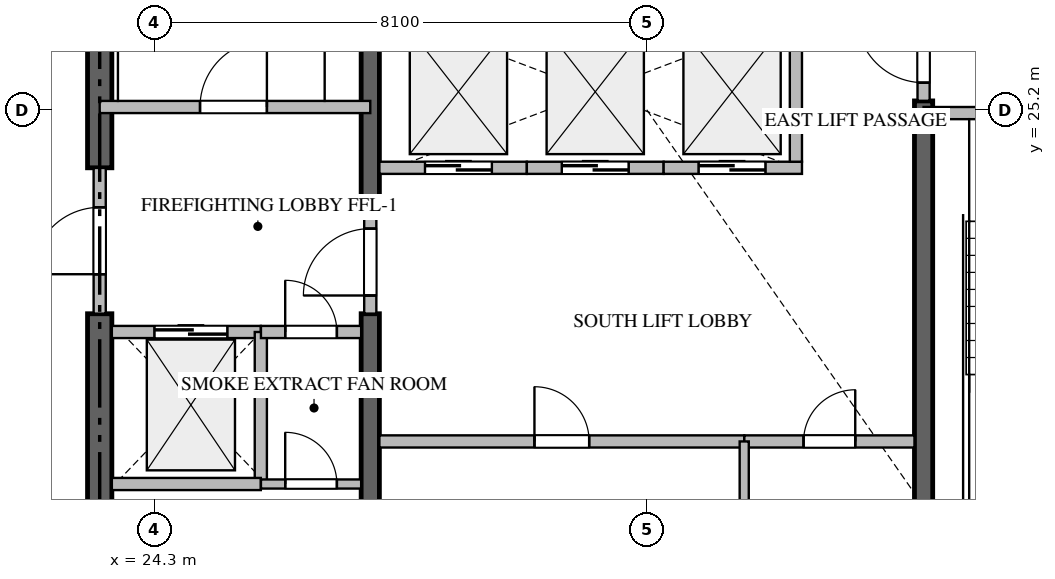
"""IFC4 building model, lengths in metres.
Left out: names, types, materials, properties, quantities, classifications, styles, units other than length and angle.
Written with IfcOpenShell. Run it as: python <this file> out.ifc"""

import sys

from ifc_helpers import new_model, si_unit, direction, frame, frame_2d, origin, place, context, subcontext, project, spatial, rectangle, extrude, source, transform, mapped, element, fill, save


model = new_model("IFC4")
c1 = context("Model", 3, precision=1e-05, world=origin(), true_north=direction((0.0, 1.0)))
c2 = subcontext(c1, "Body", "Model", "MODEL_VIEW")
j1 = project(units=[si_unit("LENGTHUNIT", "METRE"), si_unit("PLANEANGLEUNIT", "RADIAN")], contexts=[c1])
p1 = place(None, origin())
s1 = spatial("IfcSite", under=j1, at=p1, CompositionType="ELEMENT")
p2 = place(p1, origin())
s2 = spatial("IfcBuilding", under=s1, at=p2, CompositionType="ELEMENT")
p3 = place(p2, frame((0.0, 0.0, 191.4)))
s3 = spatial("IfcBuildingStorey", under=s2, at=p3, CompositionType="ELEMENT", Elevation=191.4)
p4 = place(p3, frame((23.4, 17.0, -0.26), z_axis=(0.0, 0.0, 1.0), x_axis=(0.0, 1.0, 0.0)))
e1 = element("IfcWall", 1, at=p4, inside=s3, PredefinedType="SHEAR", context=c2, shape_type="SweptSolid", body=[
    extrude(rectangle(XDim=4.85, YDim=0.4, at=frame_2d((2.425, 0.0))), origin(), (0.0, 0.0, 1.0), 3.748),
])
p5 = place(p3, frame((23.4, 24.25, -0.26), z_axis=(0.0, 0.0, 1.0), x_axis=(0.0, 1.0, 0.0)))
e2 = element("IfcWall", 2, at=p5, inside=s3, PredefinedType="SHEAR", context=c2, shape_type="SweptSolid", body=[
    extrude(rectangle(XDim=9.15, YDim=0.4, at=frame_2d((4.575, 0.0))), origin(), (0.0, 0.0, 1.0), 3.748),
])
p6 = place(p3, frame((27.85, 17.0, -0.26), z_axis=(0.0, 0.0, 1.0), x_axis=(0.0, 1.0, 0.0)))
e3 = element("IfcWall", 3, at=p6, inside=s3, PredefinedType="SHEAR", context=c2, shape_type="SweptSolid", body=[
    extrude(rectangle(XDim=4.85, YDim=0.3, at=frame_2d((2.425, 0.0))), origin(), (0.0, 0.0, 1.0), 3.748),
])
p7 = place(p3, frame((27.85, 23.55, -0.26), z_axis=(0.0, 0.0, 1.0), x_axis=(0.0, 1.0, 0.0)))
e4 = element("IfcWall", 4, at=p7, inside=s3, PredefinedType="SHEAR", context=c2, shape_type="SweptSolid", body=[
    extrude(rectangle(XDim=9.85, YDim=0.3, at=frame_2d((4.925, 0.0))), origin(), (0.0, 0.0, 1.0), 3.748),
])
p8 = place(p3, frame((36.95, 17.0, -0.26), z_axis=(0.0, 0.0, 1.0), x_axis=(0.0, 1.0, 0.0)))
e5 = element("IfcWall", 5, at=p8, inside=s3, PredefinedType="SHEAR", context=c2, shape_type="SweptSolid", body=[
    extrude(rectangle(XDim=8.35, YDim=0.3, at=frame_2d((4.175, 0.0))), origin(), (0.0, 0.0, 1.0), 3.748),
])
p9 = place(p3, frame((23.4, 25.25, 0.0), z_axis=(0.0, 0.0, 1.0), x_axis=(1.0, 0.0, 0.0)))
e6 = element("IfcWall", 6, at=p9, inside=s3, PredefinedType="STANDARD", context=c2, shape_type="SweptSolid", body=[
    extrude(rectangle(XDim=4.45, YDim=0.2, at=frame_2d((2.225, 0.0))), origin(), (0.0, 0.0, 1.0), 3.49),
])
p10 = place(p9, frame((1.65, 0.0, 0.0)))
e7 = element("IfcOpeningElement", 7, at=p10, cuts=e6, PredefinedType="OPENING", context=c2, shape_type="SweptSolid", body=[
    extrude(rectangle(XDim=1.1, YDim=2.15, at=frame_2d((0.55, 1.075))), frame((0.0, 0.11, 0.0), z_axis=(0.0, -1.0, 0.0), x_axis=(1.0, 0.0, 0.0)), (0.0, 0.0, 1.0), 0.22),
])
p11 = place(p3, frame((36.95, 25.15, 0.0), z_axis=(0.0, 0.0, 1.0), x_axis=(1.0, 0.0, 0.0)))
e8 = element("IfcWall", 8, at=p11, inside=s3, PredefinedType="STANDARD", context=c2, shape_type="SweptSolid", body=[
    extrude(rectangle(XDim=4.45, YDim=0.2, at=frame_2d((2.225, 0.0))), origin(), (0.0, 0.0, 1.0), 3.49),
])
p12 = place(p11, frame((1.65, 0.0, 0.0)))
e9 = element("IfcOpeningElement", 9, at=p12, cuts=e8, PredefinedType="OPENING", context=c2, shape_type="SweptSolid", body=[
    extrude(rectangle(XDim=1.1, YDim=2.15, at=frame_2d((0.55, 1.075))), frame((0.0, 0.11, 0.0), z_axis=(0.0, -1.0, 0.0), x_axis=(1.0, 0.0, 0.0)), (0.0, 0.0, 1.0), 0.22),
])
p13 = place(p3, frame((23.6, 21.55, 0.0), z_axis=(0.0, 0.0, 1.0), x_axis=(1.0, 0.0, 0.0)))
e10 = element("IfcWall", 10, at=p13, inside=s3, PredefinedType="STANDARD", context=c2, shape_type="SweptSolid", body=[
    extrude(rectangle(XDim=2.45, YDim=0.2, at=frame_2d((1.225, 0.0))), origin(), (0.0, 0.0, 1.0), 3.49),
])
p14 = place(p13, frame((0.7, 0.0, 0.0)))
e11 = element("IfcOpeningElement", 11, at=p14, cuts=e10, PredefinedType="OPENING", context=c2, shape_type="SweptSolid", body=[
    extrude(rectangle(XDim=1.2, YDim=2.2, at=frame_2d((0.6, 1.1))), frame((0.0, 0.11, 0.0), z_axis=(0.0, -1.0, 0.0), x_axis=(1.0, 0.0, 0.0)), (0.0, 0.0, 1.0), 0.22),
])
p15 = place(p3, frame((28.0, 24.25, 0.0), z_axis=(0.0, 0.0, 1.0), x_axis=(1.0, 0.0, 0.0)))
e12 = element("IfcWall", 12, at=p15, inside=s3, PredefinedType="STANDARD", context=c2, shape_type="SweptSolid", body=[
    extrude(rectangle(XDim=2.425, YDim=0.2, at=frame_2d((1.212, 0.0))), origin(), (0.0, 0.0, 1.0), 3.49),
])
p16 = place(p15, frame((0.75, 0.0, 0.0)))
e13 = element("IfcOpeningElement", 13, at=p16, cuts=e12, PredefinedType="OPENING", context=c2, shape_type="SweptSolid", body=[
    extrude(rectangle(XDim=1.1, YDim=2.2, at=frame_2d((0.55, 1.1))), frame((0.0, 0.11, 0.0), z_axis=(0.0, -1.0, 0.0), x_axis=(1.0, 0.0, 0.0)), (0.0, 0.0, 1.0), 0.22),
])
p17 = place(p3, frame((30.425, 24.25, 0.0), z_axis=(0.0, 0.0, 1.0), x_axis=(1.0, 0.0, 0.0)))
e14 = element("IfcWall", 14, at=p17, inside=s3, PredefinedType="STANDARD", context=c2, shape_type="SweptSolid", body=[
    extrude(rectangle(XDim=2.25, YDim=0.2, at=frame_2d((1.125, 0.0))), origin(), (0.0, 0.0, 1.0), 3.49),
])
p18 = place(p17, frame((0.575, 0.0, 0.0)))
e15 = element("IfcOpeningElement", 15, at=p18, cuts=e14, PredefinedType="OPENING", context=c2, shape_type="SweptSolid", body=[
    extrude(rectangle(XDim=1.1, YDim=2.2, at=frame_2d((0.55, 1.1))), frame((0.0, 0.11, 0.0), z_axis=(0.0, -1.0, 0.0), x_axis=(1.0, 0.0, 0.0)), (0.0, 0.0, 1.0), 0.22),
])
p19 = place(p3, frame((32.675, 24.25, 0.0), z_axis=(0.0, 0.0, 1.0), x_axis=(1.0, 0.0, 0.0)))
e16 = element("IfcWall", 16, at=p19, inside=s3, PredefinedType="STANDARD", context=c2, shape_type="SweptSolid", body=[
    extrude(rectangle(XDim=2.275, YDim=0.2, at=frame_2d((1.137, 0.0))), origin(), (0.0, 0.0, 1.0), 3.49),
])
p20 = place(p19, frame((0.575, 0.0, 0.0)))
e17 = element("IfcOpeningElement", 17, at=p20, cuts=e16, PredefinedType="OPENING", context=c2, shape_type="SweptSolid", body=[
    extrude(rectangle(XDim=1.1, YDim=2.2, at=frame_2d((0.55, 1.1))), frame((0.0, 0.11, 0.0), z_axis=(0.0, -1.0, 0.0), x_axis=(1.0, 0.0, 0.0)), (0.0, 0.0, 1.0), 0.22),
])
for number, where, z_axis, x_axis in (
    (18, (34.85, 24.35, 0.0), (0.0, 0.0, 1.0), (0.0, 1.0, 0.0)),
    (19, (26.05, 19.05, 0.0), (0.0, 0.0, 1.0), (0.0, 1.0, 0.0)),
):
    element("IfcWall", number, at=place(p3, frame(where, z_axis=z_axis, x_axis=x_axis)), inside=s3, PredefinedType="STANDARD", context=c2, shape_type="SweptSolid", body=[
        extrude(rectangle(XDim=2.5, YDim=0.2, at=frame_2d((1.25, 0.0))), origin(), (0.0, 0.0, 1.0), 3.49),
    ])
p21 = place(p3, frame((23.6, 19.05, 0.0), z_axis=(0.0, 0.0, 1.0), x_axis=(1.0, 0.0, 0.0)))
e20 = element("IfcWall", 20, at=p21, inside=s3, PredefinedType="STANDARD", context=c2, shape_type="SweptSolid", body=[
    extrude(rectangle(XDim=2.45, YDim=0.2, at=frame_2d((1.225, 0.0))), origin(), (0.0, 0.0, 1.0), 3.49),
])
p22 = place(p3, frame((26.052, 21.55, 0.0), z_axis=(0.0, 0.0, 1.0), x_axis=(1.0, 0.0, 0.0)))
e21 = element("IfcWall", 21, at=p22, inside=s3, PredefinedType="STANDARD", context=c2, shape_type="SweptSolid", body=[
    extrude(rectangle(XDim=1.648, YDim=0.2, at=frame_2d((0.824, 0.0))), origin(), (0.0, 0.0, 1.0), 3.49),
])
p23 = place(p22, frame((0.399, 0.0, 0.0)))
e22 = element("IfcOpeningElement", 22, at=p23, cuts=e21, PredefinedType="OPENING", context=c2, shape_type="SweptSolid", body=[
    extrude(rectangle(XDim=0.85, YDim=2.1, at=frame_2d((0.425, 1.05))), frame((0.0, 0.11, 0.0), z_axis=(0.0, -1.0, 0.0), x_axis=(1.0, 0.0, 0.0)), (0.0, 0.0, 1.0), 0.22),
])
p24 = place(p3, frame((23.4, 21.852, 0.0), z_axis=(0.0, 0.0, 1.0), x_axis=(0.0, 1.0, 0.0)))
e23 = element("IfcWall", 23, at=p24, inside=s3, PredefinedType="STANDARD", context=c2, shape_type="SweptSolid", body=[
    extrude(rectangle(XDim=2.396, YDim=0.2, at=frame_2d((1.198, 0.0))), origin(), (0.0, 0.0, 1.0), 3.49),
])
p25 = place(p24, frame((0.648, 0.0, 0.0)))
e24 = element("IfcOpeningElement", 24, at=p25, cuts=e23, PredefinedType="OPENING", context=c2, shape_type="SweptSolid", body=[
    extrude(rectangle(XDim=1.1, YDim=2.15, at=frame_2d((0.55, 1.075))), frame((0.0, 0.11, 0.0), z_axis=(0.0, -1.0, 0.0), x_axis=(1.0, 0.0, 0.0)), (0.0, 0.0, 1.0), 0.22),
])
p26 = place(p3, frame((27.85, 21.852, 0.0), z_axis=(0.0, 0.0, 1.0), x_axis=(0.0, 1.0, 0.0)))
e25 = element("IfcWall", 25, at=p26, inside=s3, PredefinedType="STANDARD", context=c2, shape_type="SweptSolid", body=[
    extrude(rectangle(XDim=1.696, YDim=0.2, at=frame_2d((0.848, 0.0))), origin(), (0.0, 0.0, 1.0), 3.49),
])
p27 = place(p26, frame((0.298, 0.0, 0.0)))
e26 = element("IfcOpeningElement", 26, at=p27, cuts=e25, PredefinedType="OPENING", context=c2, shape_type="SweptSolid", body=[
    extrude(rectangle(XDim=1.1, YDim=2.15, at=frame_2d((0.55, 1.075))), frame((0.0, 0.11, 0.0), z_axis=(0.0, -1.0, 0.0), x_axis=(1.0, 0.0, 0.0)), (0.0, 0.0, 1.0), 0.22),
])
p28 = place(p3, frame((36.95, 25.352, 0.0), z_axis=(0.0, 0.0, 1.0), x_axis=(0.0, 1.0, 0.0)))
e27 = element("IfcWall", 27, at=p28, inside=s3, PredefinedType="STANDARD", context=c2, shape_type="SweptSolid", body=[
    extrude(rectangle(XDim=1.696, YDim=0.2, at=frame_2d((0.848, 0.0))), origin(), (0.0, 0.0, 1.0), 3.49),
])
p29 = place(p28, frame((0.298, 0.0, 0.0)))
e28 = element("IfcOpeningElement", 28, at=p29, cuts=e27, PredefinedType="OPENING", context=c2, shape_type="SweptSolid", body=[
    extrude(rectangle(XDim=1.1, YDim=2.15, at=frame_2d((0.55, 1.075))), frame((0.0, 0.11, 0.0), z_axis=(0.0, -1.0, 0.0), x_axis=(1.0, 0.0, 0.0)), (0.0, 0.0, 1.0), 0.22),
])
p30 = place(p3, frame((26.052, 19.05, 0.0), z_axis=(0.0, 0.0, 1.0), x_axis=(1.0, 0.0, 0.0)))
e29 = element("IfcWall", 29, at=p30, inside=s3, PredefinedType="PARTITIONING", context=c2, shape_type="SweptSolid", body=[
    extrude(rectangle(XDim=1.648, YDim=0.15, at=frame_2d((0.824, 0.0))), origin(), (0.0, 0.0, 1.0), 3.49),
])
p31 = place(p30, frame((0.399, 0.0, 0.0)))
e30 = element("IfcOpeningElement", 30, at=p31, cuts=e29, PredefinedType="OPENING", context=c2, shape_type="SweptSolid", body=[
    extrude(rectangle(XDim=0.85, YDim=2.1, at=frame_2d((0.425, 1.05))), frame((0.0, 0.085, 0.0), z_axis=(0.0, -1.0, 0.0), x_axis=(1.0, 0.0, 0.0)), (0.0, 0.0, 1.0), 0.17),
])
p32 = place(p3, frame((28.0, 19.75, 0.0), z_axis=(0.0, 0.0, 1.0), x_axis=(1.0, 0.0, 0.0)))
e31 = element("IfcWall", 31, at=p32, inside=s3, PredefinedType="STANDARD", context=c2, shape_type="SweptSolid", body=[
    extrude(rectangle(XDim=6.0, YDim=0.2, at=frame_2d((3.0, 0.0))), origin(), (0.0, 0.0, 1.0), 3.49),
])
p33 = place(p32, frame((2.55, 0.0, 0.0)))
e32 = element("IfcOpeningElement", 32, at=p33, cuts=e31, PredefinedType="OPENING", context=c2, shape_type="SweptSolid", body=[
    extrude(rectangle(XDim=0.9, YDim=2.1, at=frame_2d((0.45, 1.05))), frame((0.0, 0.11, 0.0), z_axis=(0.0, -1.0, 0.0), x_axis=(1.0, 0.0, 0.0)), (0.0, 0.0, 1.0), 0.22),
])
p34 = place(p3, frame((34.002, 19.75, 0.0), z_axis=(0.0, 0.0, 1.0), x_axis=(1.0, 0.0, 0.0)))
e33 = element("IfcWall", 33, at=p34, inside=s3, PredefinedType="STANDARD", context=c2, shape_type="SweptSolid", body=[
    extrude(rectangle(XDim=2.798, YDim=0.2, at=frame_2d((1.399, 0.0))), origin(), (0.0, 0.0, 1.0), 3.49),
])
p35 = place(p34, frame((0.974, 0.0, 0.0)))
e34 = element("IfcOpeningElement", 34, at=p35, cuts=e33, PredefinedType="OPENING", context=c2, shape_type="SweptSolid", body=[
    extrude(rectangle(XDim=0.85, YDim=2.1, at=frame_2d((0.425, 1.05))), frame((0.0, 0.11, 0.0), z_axis=(0.0, -1.0, 0.0), x_axis=(1.0, 0.0, 0.0)), (0.0, 0.0, 1.0), 0.22),
])
p36 = place(p3, frame((34.0, 17.02, 0.0), z_axis=(0.0, 0.0, 1.0), x_axis=(0.0, 1.0, 0.0)))
e35 = element("IfcWall", 35, at=p36, inside=s3, PredefinedType="PARTITIONING", context=c2, shape_type="SweptSolid", body=[
    extrude(rectangle(XDim=2.73, YDim=0.15, at=frame_2d((1.365, 0.0))), origin(), (0.0, 0.0, 1.0), 3.49),
])
m1 = source(origin(), c2, "Body", "SweptSolid", [
    extrude(rectangle(XDim=1.1, YDim=2.15, at=frame_2d((0.55, 1.075))), frame((0.0, 0.025, 0.0), z_axis=(0.0, -1.0, 0.0), x_axis=(1.0, 0.0, 0.0)), (0.0, 0.0, 1.0), 0.05),
])
p37 = place(p10, origin())
e36 = element("IfcDoor", 36, at=p37, inside=s3, OperationType="SINGLE_SWING_RIGHT", PredefinedType="DOOR", context=c2, shape_type="MappedRepresentation", body=[
    mapped(m1, transform((0.0, 0.0, 0.0), scale=1.0)),
])
fill(e7, e36)
m2 = source(origin(), c2, "Body", "SweptSolid", [
    extrude(rectangle(XDim=1.2, YDim=2.2, at=frame_2d((0.6, 1.1))), frame((0.0, 0.025, 0.0), z_axis=(0.0, -1.0, 0.0), x_axis=(1.0, 0.0, 0.0)), (0.0, 0.0, 1.0), 0.05),
])
p38 = place(p14, origin())
e37 = element("IfcDoor", 37, at=p38, inside=s3, OperationType="DOUBLE_DOOR_SLIDING", PredefinedType="DOOR", context=c2, shape_type="MappedRepresentation", body=[
    mapped(m2, transform((0.0, 0.0, 0.0), scale=1.0)),
])
fill(e11, e37)
m3 = source(origin(), c2, "Body", "SweptSolid", [
    extrude(rectangle(XDim=1.1, YDim=2.2, at=frame_2d((0.55, 1.1))), frame((0.0, 0.025, 0.0), z_axis=(0.0, -1.0, 0.0), x_axis=(1.0, 0.0, 0.0)), (0.0, 0.0, 1.0), 0.05),
])
p39 = place(p16, origin())
e38 = element("IfcDoor", 38, at=p39, inside=s3, OperationType="DOUBLE_DOOR_SLIDING", PredefinedType="DOOR", context=c2, shape_type="MappedRepresentation", body=[
    mapped(m3, transform((0.0, 0.0, 0.0), scale=1.0)),
])
fill(e13, e38)
p40 = place(p18, origin())
e39 = element("IfcDoor", 39, at=p40, inside=s3, OperationType="DOUBLE_DOOR_SLIDING", PredefinedType="DOOR", context=c2, shape_type="MappedRepresentation", body=[
    mapped(m3, transform((0.0, 0.0, 0.0), scale=1.0)),
])
fill(e15, e39)
p41 = place(p20, origin())
e40 = element("IfcDoor", 40, at=p41, inside=s3, OperationType="DOUBLE_DOOR_SLIDING", PredefinedType="DOOR", context=c2, shape_type="MappedRepresentation", body=[
    mapped(m3, transform((0.0, 0.0, 0.0), scale=1.0)),
])
fill(e17, e40)
m4 = source(origin(), c2, "Body", "SweptSolid", [
    extrude(rectangle(XDim=0.85, YDim=2.1, at=frame_2d((0.425, 1.05))), frame((0.0, 0.025, 0.0), z_axis=(0.0, -1.0, 0.0), x_axis=(1.0, 0.0, 0.0)), (0.0, 0.0, 1.0), 0.05),
])
p42 = place(p23, origin())
e41 = element("IfcDoor", 41, at=p42, inside=s3, OperationType="SINGLE_SWING_LEFT", PredefinedType="DOOR", context=c2, shape_type="MappedRepresentation", body=[
    mapped(m4, transform((0.0, 0.0, 0.0), scale=1.0)),
])
fill(e22, e41)
p43 = place(p25, origin())
e42 = element("IfcDoor", 42, at=p43, inside=s3, OperationType="SINGLE_SWING_LEFT", PredefinedType="DOOR", context=c2, shape_type="MappedRepresentation", body=[
    mapped(m1, transform((0.0, 0.0, 0.0), scale=1.0)),
])
fill(e24, e42)
p44 = place(p27, origin())
e43 = element("IfcDoor", 43, at=p44, inside=s3, OperationType="SINGLE_SWING_LEFT", PredefinedType="DOOR", context=c2, shape_type="MappedRepresentation", body=[
    mapped(m1, transform((0.0, 0.0, 0.0), scale=1.0)),
])
fill(e26, e43)
p45 = place(p29, origin())
e44 = element("IfcDoor", 44, at=p45, inside=s3, OperationType="SINGLE_SWING_RIGHT", PredefinedType="DOOR", context=c2, shape_type="MappedRepresentation", body=[
    mapped(m1, transform((0.0, 0.0, 0.0), scale=1.0)),
])
fill(e28, e44)
p46 = place(p31, origin())
e45 = element("IfcDoor", 45, at=p46, inside=s3, OperationType="SINGLE_SWING_LEFT", PredefinedType="DOOR", context=c2, shape_type="MappedRepresentation", body=[
    mapped(m4, transform((0.0, 0.0, 0.0), scale=1.0)),
])
fill(e30, e45)
m5 = source(origin(), c2, "Body", "SweptSolid", [
    extrude(rectangle(XDim=0.9, YDim=2.1, at=frame_2d((0.45, 1.05))), frame((0.0, 0.025, 0.0), z_axis=(0.0, -1.0, 0.0), x_axis=(1.0, 0.0, 0.0)), (0.0, 0.0, 1.0), 0.05),
])
p47 = place(p33, origin())
e46 = element("IfcDoor", 46, at=p47, inside=s3, OperationType="SINGLE_SWING_LEFT", PredefinedType="DOOR", context=c2, shape_type="MappedRepresentation", body=[
    mapped(m5, transform((0.0, 0.0, 0.0), scale=1.0)),
])
fill(e32, e46)
p48 = place(p35, origin())
e47 = element("IfcDoor", 47, at=p48, inside=s3, OperationType="SINGLE_SWING_RIGHT", PredefinedType="DOOR", context=c2, shape_type="MappedRepresentation", body=[
    mapped(m4, transform((0.0, 0.0, 0.0), scale=1.0)),
])
fill(e34, e47)
save(model, sys.argv[1])
